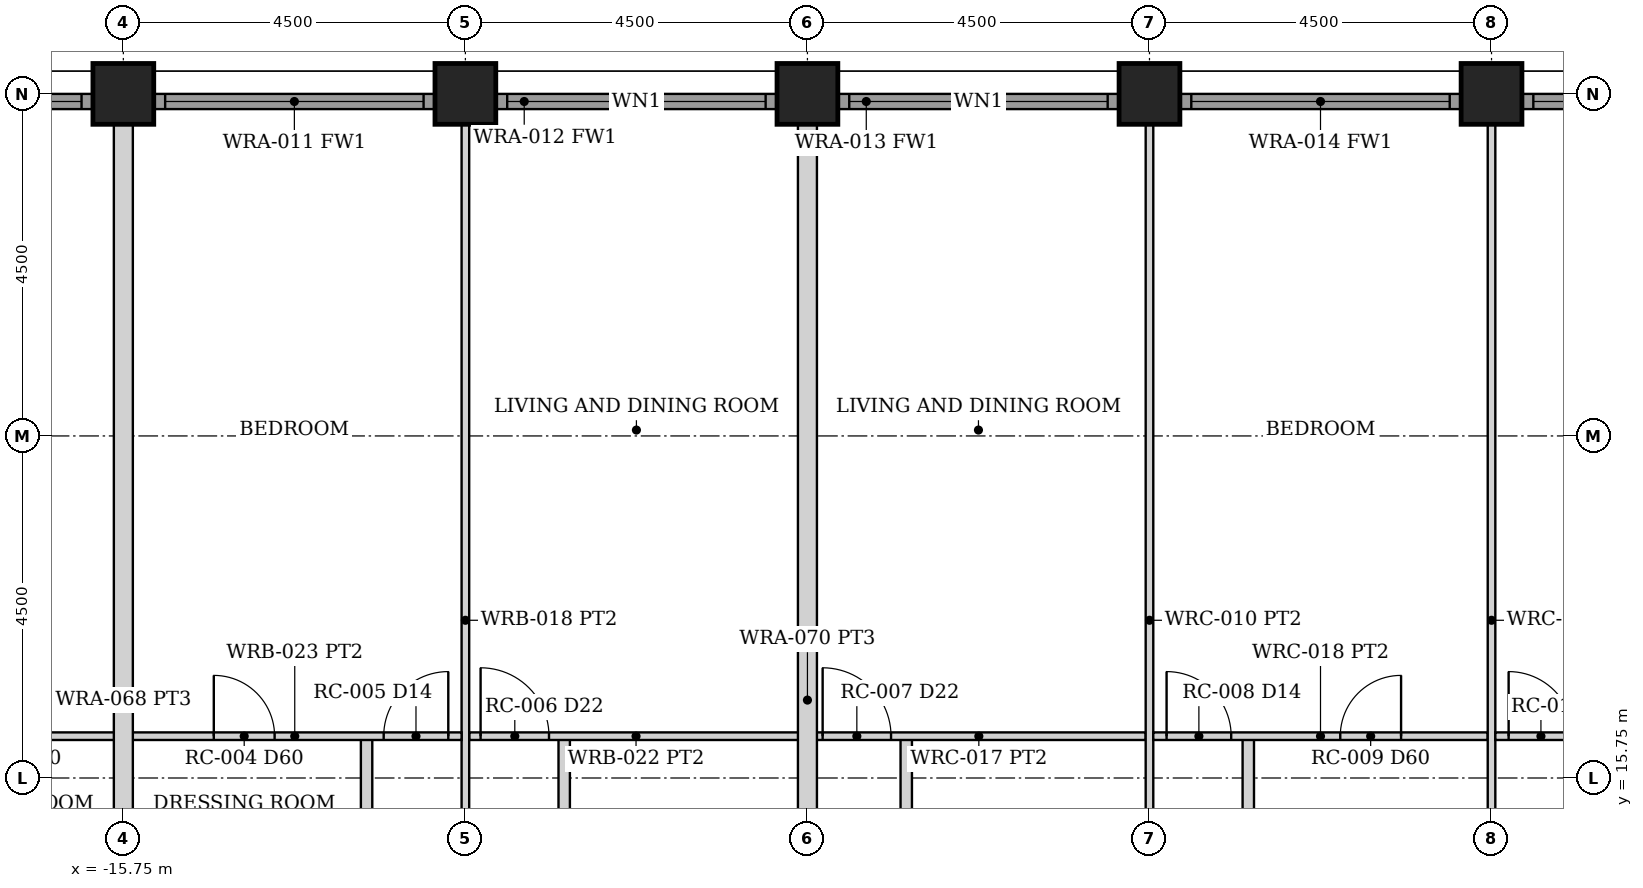
"""IFC4 building model, lengths in metres.
Left out: names, types, materials, properties, quantities, classifications, styles, units other than length and angle.
Written with IfcOpenShell. Run it as: python <this file> out.ifc"""

import sys

from ifc_helpers import new_model, si_unit, direction, frame, frame_2d, origin, origin_2d, place, context, subcontext, project, spatial, rectangle, hollow_rectangle, extrude, element, fill, save


model = new_model("IFC4")
c1 = context("Model", 3, precision=1e-05, world=origin(), true_north=direction((0.0, 1.0)))
c2 = subcontext(c1, "Body", "Model", "MODEL_VIEW")
j1 = project(units=[si_unit("LENGTHUNIT", "METRE"), si_unit("PLANEANGLEUNIT", "RADIAN")], contexts=[c1])
p1 = place(None, origin())
s1 = spatial("IfcSite", under=j1, at=p1, CompositionType="ELEMENT")
p2 = place(p1, origin())
s2 = spatial("IfcBuilding", under=s1, at=p2, CompositionType="ELEMENT")
p3 = place(p2, frame((0.0, 0.0, 47.5)))
s3 = spatial("IfcBuildingStorey", under=s2, at=p3, CompositionType="ELEMENT", Elevation=47.5)
for number, where, z_axis, x_axis in (
    (1, (-15.75, 24.75, 0.0), (0.0, 0.0, 1.0), (0.0, 1.0, 0.0)),
    (2, (-11.25, 24.75, 0.0), (0.0, 0.0, 1.0), (0.0, 1.0, 0.0)),
    (3, (-6.75, 24.75, 0.0), (0.0, 0.0, 1.0), (0.0, 1.0, 0.0)),
    (4, (-2.25, 24.75, 0.0), (0.0, 0.0, 1.0), (0.0, 1.0, 0.0)),
    (5, (2.25, 24.75, 0.0), (0.0, 0.0, 1.0), (0.0, 1.0, 0.0)),
):
    element("IfcColumn", number, at=place(p3, frame(where, z_axis=z_axis, x_axis=x_axis)), inside=s3, PredefinedType="COLUMN", context=c2, shape_type="SweptSolid", body=[
        extrude(hollow_rectangle(XDim=0.8, YDim=0.8, WallThickness=0.07, at=origin_2d()), origin(), (0.0, 0.0, 1.0), 3.5),
    ])
p4 = place(p3, frame((-19.845, 24.65, 0.0), z_axis=(0.0, 0.0, 1.0), x_axis=(1.0, 0.0, 0.0)))
e6 = element("IfcWall", 6, at=p4, inside=s3, PredefinedType="SOLIDWALL", context=c2, shape_type="SweptSolid", body=[
    extrude(rectangle(XDim=3.69, YDim=0.2, at=frame_2d((1.845, 0.0))), origin(), (0.0, 0.0, 1.0), 2.379),
])
p5 = place(p4, frame((0.145, 0.0, 0.3)))
e7 = element("IfcOpeningElement", 7, at=p5, cuts=e6, PredefinedType="OPENING", context=c2, shape_type="SweptSolid", body=[
    extrude(rectangle(XDim=3.4, YDim=1.929, at=frame_2d((1.7, 0.964))), frame((0.0, 0.11, 0.0), z_axis=(0.0, -1.0, 0.0), x_axis=(1.0, 0.0, 0.0)), (0.0, 0.0, 1.0), 0.22),
])
p6 = place(p3, frame((-15.345, 24.65, 0.0), z_axis=(0.0, 0.0, 1.0), x_axis=(1.0, 0.0, 0.0)))
e8 = element("IfcWall", 8, at=p6, inside=s3, PredefinedType="SOLIDWALL", context=c2, shape_type="SweptSolid", body=[
    extrude(rectangle(XDim=3.69, YDim=0.2, at=frame_2d((1.845, 0.0))), origin(), (0.0, 0.0, 1.0), 2.379),
])
p7 = place(p6, frame((0.145, 0.0, 0.3)))
e9 = element("IfcOpeningElement", 9, at=p7, cuts=e8, PredefinedType="OPENING", context=c2, shape_type="SweptSolid", body=[
    extrude(rectangle(XDim=3.4, YDim=1.929, at=frame_2d((1.7, 0.964))), frame((0.0, 0.11, 0.0), z_axis=(0.0, -1.0, 0.0), x_axis=(1.0, 0.0, 0.0)), (0.0, 0.0, 1.0), 0.22),
])
p8 = place(p3, frame((-10.845, 24.65, 0.0), z_axis=(0.0, 0.0, 1.0), x_axis=(1.0, 0.0, 0.0)))
e10 = element("IfcWall", 10, at=p8, inside=s3, PredefinedType="SOLIDWALL", context=c2, shape_type="SweptSolid", body=[
    extrude(rectangle(XDim=3.69, YDim=0.2, at=frame_2d((1.845, 0.0))), origin(), (0.0, 0.0, 1.0), 2.379),
])
p9 = place(p8, frame((0.145, 0.0, 0.3)))
e11 = element("IfcOpeningElement", 11, at=p9, cuts=e10, PredefinedType="OPENING", context=c2, shape_type="SweptSolid", body=[
    extrude(rectangle(XDim=3.4, YDim=1.929, at=frame_2d((1.7, 0.964))), frame((0.0, 0.11, 0.0), z_axis=(0.0, -1.0, 0.0), x_axis=(1.0, 0.0, 0.0)), (0.0, 0.0, 1.0), 0.22),
])
p10 = place(p3, frame((-6.345, 24.65, 0.0), z_axis=(0.0, 0.0, 1.0), x_axis=(1.0, 0.0, 0.0)))
e12 = element("IfcWall", 12, at=p10, inside=s3, PredefinedType="SOLIDWALL", context=c2, shape_type="SweptSolid", body=[
    extrude(rectangle(XDim=3.69, YDim=0.2, at=frame_2d((1.845, 0.0))), origin(), (0.0, 0.0, 1.0), 2.379),
])
p11 = place(p10, frame((0.145, 0.0, 0.3)))
e13 = element("IfcOpeningElement", 13, at=p11, cuts=e12, PredefinedType="OPENING", context=c2, shape_type="SweptSolid", body=[
    extrude(rectangle(XDim=3.4, YDim=1.929, at=frame_2d((1.7, 0.964))), frame((0.0, 0.11, 0.0), z_axis=(0.0, -1.0, 0.0), x_axis=(1.0, 0.0, 0.0)), (0.0, 0.0, 1.0), 0.22),
])
p12 = place(p3, frame((-1.845, 24.65, 0.0), z_axis=(0.0, 0.0, 1.0), x_axis=(1.0, 0.0, 0.0)))
e14 = element("IfcWall", 14, at=p12, inside=s3, PredefinedType="SOLIDWALL", context=c2, shape_type="SweptSolid", body=[
    extrude(rectangle(XDim=3.69, YDim=0.2, at=frame_2d((1.845, 0.0))), origin(), (0.0, 0.0, 1.0), 2.379),
])
p13 = place(p12, frame((0.145, 0.0, 0.3)))
e15 = element("IfcOpeningElement", 15, at=p13, cuts=e14, PredefinedType="OPENING", context=c2, shape_type="SweptSolid", body=[
    extrude(rectangle(XDim=3.4, YDim=1.929, at=frame_2d((1.7, 0.964))), frame((0.0, 0.11, 0.0), z_axis=(0.0, -1.0, 0.0), x_axis=(1.0, 0.0, 0.0)), (0.0, 0.0, 1.0), 0.22),
])
p14 = place(p3, frame((2.655, 24.65, 0.0), z_axis=(0.0, 0.0, 1.0), x_axis=(1.0, 0.0, 0.0)))
e16 = element("IfcWall", 16, at=p14, inside=s3, PredefinedType="SOLIDWALL", context=c2, shape_type="SweptSolid", body=[
    extrude(rectangle(XDim=3.69, YDim=0.2, at=frame_2d((1.845, 0.0))), origin(), (0.0, 0.0, 1.0), 2.379),
])
p15 = place(p14, frame((0.145, 0.0, 0.3)))
e17 = element("IfcOpeningElement", 17, at=p15, cuts=e16, PredefinedType="OPENING", context=c2, shape_type="SweptSolid", body=[
    extrude(rectangle(XDim=3.4, YDim=1.929, at=frame_2d((1.7, 0.964))), frame((0.0, 0.11, 0.0), z_axis=(0.0, -1.0, 0.0), x_axis=(1.0, 0.0, 0.0)), (0.0, 0.0, 1.0), 0.22),
])
p16 = place(p3, frame((-20.2, 16.3, 0.0), z_axis=(0.0, 0.0, 1.0), x_axis=(1.0, 0.0, 0.0)))
e18 = element("IfcWall", 18, at=p16, inside=s3, PredefinedType="PARTITIONING", context=c2, shape_type="SweptSolid", body=[
    extrude(rectangle(XDim=4.39, YDim=0.1, at=frame_2d((2.195, 0.0))), origin(), (0.0, 0.0, 1.0), 2.373),
])
p17 = place(p16, frame((0.175, 0.0, 0.0)))
e19 = element("IfcOpeningElement", 19, at=p17, cuts=e18, PredefinedType="OPENING", context=c2, shape_type="SweptSolid", body=[
    extrude(rectangle(XDim=0.85, YDim=2.1, at=frame_2d((0.425, 1.05))), frame((0.0, 0.06, 0.0), z_axis=(0.0, -1.0, 0.0), x_axis=(1.0, 0.0, 0.0)), (0.0, 0.0, 1.0), 0.12),
])
p18 = place(p16, frame((2.46, 0.0, 0.0)))
e20 = element("IfcOpeningElement", 20, at=p18, cuts=e18, PredefinedType="OPENING", context=c2, shape_type="SweptSolid", body=[
    extrude(rectangle(XDim=0.8, YDim=2.1, at=frame_2d((0.4, 1.05))), frame((0.0, 0.06, 0.0), z_axis=(0.0, -1.0, 0.0), x_axis=(1.0, 0.0, 0.0)), (0.0, 0.0, 1.0), 0.12),
])
p19 = place(p3, frame((-9.95, 11.3, 0.0), z_axis=(0.0, 0.0, 1.0), x_axis=(0.0, 1.0, 0.0)))
e21 = element("IfcWall", 21, at=p19, inside=s3, PredefinedType="PARTITIONING", context=c2, shape_type="SweptSolid", body=[
    extrude(rectangle(XDim=5.0, YDim=0.15, at=frame_2d((2.5, 0.0))), origin(), (0.0, 0.0, 1.0), 2.373),
])
p20 = place(p19, frame((2.05, 0.0, 0.0)))
e22 = element("IfcOpeningElement", 22, at=p20, cuts=e21, PredefinedType="OPENING", context=c2, shape_type="SweptSolid", body=[
    extrude(rectangle(XDim=0.9, YDim=2.1, at=frame_2d((0.45, 1.05))), frame((0.0, 0.085, 0.0), z_axis=(0.0, -1.0, 0.0), x_axis=(1.0, 0.0, 0.0)), (0.0, 0.0, 1.0), 0.17),
])
p21 = place(p3, frame((-11.2, 16.3, 0.0), z_axis=(0.0, 0.0, 1.0), x_axis=(1.0, 0.0, 0.0)))
e23 = element("IfcWall", 23, at=p21, inside=s3, PredefinedType="PARTITIONING", context=c2, shape_type="SweptSolid", body=[
    extrude(rectangle(XDim=4.39, YDim=0.1, at=frame_2d((2.195, 0.0))), origin(), (0.0, 0.0, 1.0), 2.373),
])
p22 = place(p21, frame((0.15, 0.0, 0.0)))
e24 = element("IfcOpeningElement", 24, at=p22, cuts=e23, PredefinedType="OPENING", context=c2, shape_type="SweptSolid", body=[
    extrude(rectangle(XDim=0.9, YDim=2.1, at=frame_2d((0.45, 1.05))), frame((0.0, 0.06, 0.0), z_axis=(0.0, -1.0, 0.0), x_axis=(1.0, 0.0, 0.0)), (0.0, 0.0, 1.0), 0.12),
])
p23 = place(p3, frame((-11.25, 11.3, 0.0), z_axis=(0.0, 0.0, 1.0), x_axis=(0.0, 1.0, 0.0)))
e25 = element("IfcWall", 25, at=p23, inside=s3, PredefinedType="PARTITIONING", context=c2, shape_type="SweptSolid", body=[
    extrude(rectangle(XDim=13.05, YDim=0.1, at=frame_2d((6.525, 0.0))), origin(), (0.0, 0.0, 1.0), 2.373),
])
p24 = place(p3, frame((-12.55, 11.3, 0.0), z_axis=(0.0, 0.0, 1.0), x_axis=(0.0, 1.0, 0.0)))
e26 = element("IfcWall", 26, at=p24, inside=s3, PredefinedType="PARTITIONING", context=c2, shape_type="SweptSolid", body=[
    extrude(rectangle(XDim=5.0, YDim=0.15, at=frame_2d((2.5, 0.0))), origin(), (0.0, 0.0, 1.0), 2.373),
])
p25 = place(p24, frame((0.85, 0.0, 0.0)))
e27 = element("IfcOpeningElement", 27, at=p25, cuts=e26, PredefinedType="OPENING", context=c2, shape_type="SweptSolid", body=[
    extrude(rectangle(XDim=0.9, YDim=2.1, at=frame_2d((0.45, 1.05))), frame((0.0, 0.085, 0.0), z_axis=(0.0, -1.0, 0.0), x_axis=(1.0, 0.0, 0.0)), (0.0, 0.0, 1.0), 0.17),
])
p26 = place(p3, frame((-15.69, 16.3, 0.0), z_axis=(0.0, 0.0, 1.0), x_axis=(1.0, 0.0, 0.0)))
e28 = element("IfcWall", 28, at=p26, inside=s3, PredefinedType="PARTITIONING", context=c2, shape_type="SweptSolid", body=[
    extrude(rectangle(XDim=4.39, YDim=0.1, at=frame_2d((2.195, 0.0))), origin(), (0.0, 0.0, 1.0), 2.373),
])
p27 = place(p26, frame((3.365, 0.0, 0.0)))
e29 = element("IfcOpeningElement", 29, at=p27, cuts=e28, PredefinedType="OPENING", context=c2, shape_type="SweptSolid", body=[
    extrude(rectangle(XDim=0.85, YDim=2.1, at=frame_2d((0.425, 1.05))), frame((0.0, 0.06, 0.0), z_axis=(0.0, -1.0, 0.0), x_axis=(1.0, 0.0, 0.0)), (0.0, 0.0, 1.0), 0.12),
])
p28 = place(p26, frame((1.13, 0.0, 0.0)))
e30 = element("IfcOpeningElement", 30, at=p28, cuts=e28, PredefinedType="OPENING", context=c2, shape_type="SweptSolid", body=[
    extrude(rectangle(XDim=0.8, YDim=2.1, at=frame_2d((0.4, 1.05))), frame((0.0, 0.06, 0.0), z_axis=(0.0, -1.0, 0.0), x_axis=(1.0, 0.0, 0.0)), (0.0, 0.0, 1.0), 0.12),
])
p29 = place(p3, frame((-5.45, 11.3, 0.0), z_axis=(0.0, 0.0, 1.0), x_axis=(0.0, 1.0, 0.0)))
e31 = element("IfcWall", 31, at=p29, inside=s3, PredefinedType="PARTITIONING", context=c2, shape_type="SweptSolid", body=[
    extrude(rectangle(XDim=5.0, YDim=0.15, at=frame_2d((2.5, 0.0))), origin(), (0.0, 0.0, 1.0), 2.373),
])
p30 = place(p29, frame((2.05, 0.0, 0.0)))
e32 = element("IfcOpeningElement", 32, at=p30, cuts=e31, PredefinedType="OPENING", context=c2, shape_type="SweptSolid", body=[
    extrude(rectangle(XDim=0.9, YDim=2.1, at=frame_2d((0.45, 1.05))), frame((0.0, 0.085, 0.0), z_axis=(0.0, -1.0, 0.0), x_axis=(1.0, 0.0, 0.0)), (0.0, 0.0, 1.0), 0.17),
])
p31 = place(p3, frame((-6.69, 16.3, 0.0), z_axis=(0.0, 0.0, 1.0), x_axis=(1.0, 0.0, 0.0)))
e33 = element("IfcWall", 33, at=p31, inside=s3, PredefinedType="PARTITIONING", context=c2, shape_type="SweptSolid", body=[
    extrude(rectangle(XDim=4.39, YDim=0.1, at=frame_2d((2.195, 0.0))), origin(), (0.0, 0.0, 1.0), 2.373),
])
p32 = place(p31, frame((0.14, 0.0, 0.0)))
e34 = element("IfcOpeningElement", 34, at=p32, cuts=e33, PredefinedType="OPENING", context=c2, shape_type="SweptSolid", body=[
    extrude(rectangle(XDim=0.9, YDim=2.1, at=frame_2d((0.45, 1.05))), frame((0.0, 0.06, 0.0), z_axis=(0.0, -1.0, 0.0), x_axis=(1.0, 0.0, 0.0)), (0.0, 0.0, 1.0), 0.12),
])
p33 = place(p3, frame((-2.25, 11.3, 0.0), z_axis=(0.0, 0.0, 1.0), x_axis=(0.0, 1.0, 0.0)))
e35 = element("IfcWall", 35, at=p33, inside=s3, PredefinedType="PARTITIONING", context=c2, shape_type="SweptSolid", body=[
    extrude(rectangle(XDim=13.05, YDim=0.1, at=frame_2d((6.525, 0.0))), origin(), (0.0, 0.0, 1.0), 2.373),
])
p34 = place(p3, frame((-0.95, 11.3, 0.0), z_axis=(0.0, 0.0, 1.0), x_axis=(0.0, 1.0, 0.0)))
e36 = element("IfcWall", 36, at=p34, inside=s3, PredefinedType="PARTITIONING", context=c2, shape_type="SweptSolid", body=[
    extrude(rectangle(XDim=5.0, YDim=0.15, at=frame_2d((2.5, 0.0))), origin(), (0.0, 0.0, 1.0), 2.373),
])
p35 = place(p34, frame((0.85, 0.0, 0.0)))
e37 = element("IfcOpeningElement", 37, at=p35, cuts=e36, PredefinedType="OPENING", context=c2, shape_type="SweptSolid", body=[
    extrude(rectangle(XDim=0.9, YDim=2.1, at=frame_2d((0.45, 1.05))), frame((0.0, 0.085, 0.0), z_axis=(0.0, -1.0, 0.0), x_axis=(1.0, 0.0, 0.0)), (0.0, 0.0, 1.0), 0.17),
])
p36 = place(p3, frame((-2.2, 16.3, 0.0), z_axis=(0.0, 0.0, 1.0), x_axis=(1.0, 0.0, 0.0)))
e38 = element("IfcWall", 38, at=p36, inside=s3, PredefinedType="PARTITIONING", context=c2, shape_type="SweptSolid", body=[
    extrude(rectangle(XDim=4.4, YDim=0.1, at=frame_2d((2.2, 0.0))), origin(), (0.0, 0.0, 1.0), 2.373),
])
p37 = place(p36, frame((0.175, 0.0, 0.0)))
e39 = element("IfcOpeningElement", 39, at=p37, cuts=e38, PredefinedType="OPENING", context=c2, shape_type="SweptSolid", body=[
    extrude(rectangle(XDim=0.85, YDim=2.1, at=frame_2d((0.425, 1.05))), frame((0.0, 0.06, 0.0), z_axis=(0.0, -1.0, 0.0), x_axis=(1.0, 0.0, 0.0)), (0.0, 0.0, 1.0), 0.12),
])
p38 = place(p36, frame((2.46, 0.0, 0.0)))
e40 = element("IfcOpeningElement", 40, at=p38, cuts=e38, PredefinedType="OPENING", context=c2, shape_type="SweptSolid", body=[
    extrude(rectangle(XDim=0.8, YDim=2.1, at=frame_2d((0.4, 1.05))), frame((0.0, 0.06, 0.0), z_axis=(0.0, -1.0, 0.0), x_axis=(1.0, 0.0, 0.0)), (0.0, 0.0, 1.0), 0.12),
])
p39 = place(p3, frame((2.25, 11.3, 0.0), z_axis=(0.0, 0.0, 1.0), x_axis=(0.0, 1.0, 0.0)))
e41 = element("IfcWall", 41, at=p39, inside=s3, PredefinedType="PARTITIONING", context=c2, shape_type="SweptSolid", body=[
    extrude(rectangle(XDim=13.05, YDim=0.1, at=frame_2d((6.525, 0.0))), origin(), (0.0, 0.0, 1.0), 2.373),
])
p40 = place(p3, frame((2.3, 16.3, 0.0), z_axis=(0.0, 0.0, 1.0), x_axis=(1.0, 0.0, 0.0)))
e42 = element("IfcWall", 42, at=p40, inside=s3, PredefinedType="PARTITIONING", context=c2, shape_type="SweptSolid", body=[
    extrude(rectangle(XDim=4.39, YDim=0.1, at=frame_2d((2.195, 0.0))), origin(), (0.0, 0.0, 1.0), 2.373),
])
p41 = place(p40, frame((0.175, 0.0, 0.0)))
e43 = element("IfcOpeningElement", 43, at=p41, cuts=e42, PredefinedType="OPENING", context=c2, shape_type="SweptSolid", body=[
    extrude(rectangle(XDim=0.85, YDim=2.1, at=frame_2d((0.425, 1.05))), frame((0.0, 0.06, 0.0), z_axis=(0.0, -1.0, 0.0), x_axis=(1.0, 0.0, 0.0)), (0.0, 0.0, 1.0), 0.12),
])
p42 = place(p40, frame((2.46, 0.0, 0.0)))
e44 = element("IfcOpeningElement", 44, at=p42, cuts=e42, PredefinedType="OPENING", context=c2, shape_type="SweptSolid", body=[
    extrude(rectangle(XDim=0.8, YDim=2.1, at=frame_2d((0.4, 1.05))), frame((0.0, 0.06, 0.0), z_axis=(0.0, -1.0, 0.0), x_axis=(1.0, 0.0, 0.0)), (0.0, 0.0, 1.0), 0.12),
])
for number, where, z_axis, x_axis in (
    (45, (-15.75, 9.2, 0.0), (0.0, 0.0, 1.0), (0.0, 1.0, 0.0)),
    (46, (-6.75, 9.2, 0.0), (0.0, 0.0, 1.0), (0.0, 1.0, 0.0)),
):
    element("IfcWall", number, at=place(p3, frame(where, z_axis=z_axis, x_axis=x_axis)), inside=s3, PredefinedType="PARTITIONING", context=c2, shape_type="SweptSolid", body=[
        extrude(rectangle(XDim=15.15, YDim=0.25, at=frame_2d((7.575, 0.0))), origin(), (0.0, 0.0, 1.0), 2.373),
    ])
p43 = place(p5, origin())
e47 = element("IfcWindow", 47, at=p43, inside=s3, PartitioningType="SINGLE_PANEL", PredefinedType="WINDOW", context=c2, shape_type="SweptSolid", body=[
    extrude(rectangle(XDim=3.4, YDim=1.929, at=frame_2d((1.7, 0.964))), frame((0.0, 0.03, 0.0), z_axis=(0.0, -1.0, 0.0), x_axis=(1.0, 0.0, 0.0)), (0.0, 0.0, 1.0), 0.06),
])
fill(e7, e47)
p44 = place(p7, origin())
e48 = element("IfcWindow", 48, at=p44, inside=s3, PartitioningType="SINGLE_PANEL", PredefinedType="WINDOW", context=c2, shape_type="SweptSolid", body=[
    extrude(rectangle(XDim=3.4, YDim=1.929, at=frame_2d((1.7, 0.964))), frame((0.0, 0.03, 0.0), z_axis=(0.0, -1.0, 0.0), x_axis=(1.0, 0.0, 0.0)), (0.0, 0.0, 1.0), 0.06),
])
fill(e9, e48)
p45 = place(p9, origin())
e49 = element("IfcWindow", 49, at=p45, inside=s3, PartitioningType="SINGLE_PANEL", PredefinedType="WINDOW", context=c2, shape_type="SweptSolid", body=[
    extrude(rectangle(XDim=3.4, YDim=1.929, at=frame_2d((1.7, 0.964))), frame((0.0, 0.03, 0.0), z_axis=(0.0, -1.0, 0.0), x_axis=(1.0, 0.0, 0.0)), (0.0, 0.0, 1.0), 0.06),
])
fill(e11, e49)
p46 = place(p11, origin())
e50 = element("IfcWindow", 50, at=p46, inside=s3, PartitioningType="SINGLE_PANEL", PredefinedType="WINDOW", context=c2, shape_type="SweptSolid", body=[
    extrude(rectangle(XDim=3.4, YDim=1.929, at=frame_2d((1.7, 0.964))), frame((0.0, 0.03, 0.0), z_axis=(0.0, -1.0, 0.0), x_axis=(1.0, 0.0, 0.0)), (0.0, 0.0, 1.0), 0.06),
])
fill(e13, e50)
p47 = place(p13, origin())
e51 = element("IfcWindow", 51, at=p47, inside=s3, PartitioningType="SINGLE_PANEL", PredefinedType="WINDOW", context=c2, shape_type="SweptSolid", body=[
    extrude(rectangle(XDim=3.4, YDim=1.929, at=frame_2d((1.7, 0.964))), frame((0.0, 0.03, 0.0), z_axis=(0.0, -1.0, 0.0), x_axis=(1.0, 0.0, 0.0)), (0.0, 0.0, 1.0), 0.06),
])
fill(e15, e51)
p48 = place(p15, origin())
e52 = element("IfcWindow", 52, at=p48, inside=s3, PartitioningType="SINGLE_PANEL", PredefinedType="WINDOW", context=c2, shape_type="SweptSolid", body=[
    extrude(rectangle(XDim=3.4, YDim=1.929, at=frame_2d((1.7, 0.964))), frame((0.0, 0.03, 0.0), z_axis=(0.0, -1.0, 0.0), x_axis=(1.0, 0.0, 0.0)), (0.0, 0.0, 1.0), 0.06),
])
fill(e17, e52)
p49 = place(p22, origin())
e53 = element("IfcDoor", 53, at=p49, inside=s3, OperationType="SINGLE_SWING_LEFT", PredefinedType="DOOR", context=c2, shape_type="SweptSolid", body=[
    extrude(rectangle(XDim=0.9, YDim=2.1, at=frame_2d((0.45, 1.05))), frame((0.0, 0.025, 0.0), z_axis=(0.0, -1.0, 0.0), x_axis=(1.0, 0.0, 0.0)), (0.0, 0.0, 1.0), 0.05),
])
fill(e24, e53)
p50 = place(p27, origin())
e54 = element("IfcDoor", 54, at=p50, inside=s3, OperationType="SINGLE_SWING_RIGHT", PredefinedType="DOOR", context=c2, shape_type="SweptSolid", body=[
    extrude(rectangle(XDim=0.85, YDim=2.1, at=frame_2d((0.425, 1.05))), frame((0.0, 0.025, 0.0), z_axis=(0.0, -1.0, 0.0), x_axis=(1.0, 0.0, 0.0)), (0.0, 0.0, 1.0), 0.05),
])
fill(e29, e54)
p51 = place(p28, origin())
e55 = element("IfcDoor", 55, at=p51, inside=s3, OperationType="SINGLE_SWING_LEFT", PredefinedType="DOOR", context=c2, shape_type="SweptSolid", body=[
    extrude(rectangle(XDim=0.8, YDim=2.1, at=frame_2d((0.4, 1.05))), frame((0.0, 0.025, 0.0), z_axis=(0.0, -1.0, 0.0), x_axis=(1.0, 0.0, 0.0)), (0.0, 0.0, 1.0), 0.05),
])
fill(e30, e55)
p52 = place(p32, origin())
e56 = element("IfcDoor", 56, at=p52, inside=s3, OperationType="SINGLE_SWING_LEFT", PredefinedType="DOOR", context=c2, shape_type="SweptSolid", body=[
    extrude(rectangle(XDim=0.9, YDim=2.1, at=frame_2d((0.45, 1.05))), frame((0.0, 0.025, 0.0), z_axis=(0.0, -1.0, 0.0), x_axis=(1.0, 0.0, 0.0)), (0.0, 0.0, 1.0), 0.05),
])
fill(e34, e56)
p53 = place(p37, origin())
e57 = element("IfcDoor", 57, at=p53, inside=s3, OperationType="SINGLE_SWING_LEFT", PredefinedType="DOOR", context=c2, shape_type="SweptSolid", body=[
    extrude(rectangle(XDim=0.85, YDim=2.1, at=frame_2d((0.425, 1.05))), frame((0.0, 0.025, 0.0), z_axis=(0.0, -1.0, 0.0), x_axis=(1.0, 0.0, 0.0)), (0.0, 0.0, 1.0), 0.05),
])
fill(e39, e57)
p54 = place(p38, origin())
e58 = element("IfcDoor", 58, at=p54, inside=s3, OperationType="SINGLE_SWING_RIGHT", PredefinedType="DOOR", context=c2, shape_type="SweptSolid", body=[
    extrude(rectangle(XDim=0.8, YDim=2.1, at=frame_2d((0.4, 1.05))), frame((0.0, 0.025, 0.0), z_axis=(0.0, -1.0, 0.0), x_axis=(1.0, 0.0, 0.0)), (0.0, 0.0, 1.0), 0.05),
])
fill(e40, e58)
p55 = place(p41, origin())
e59 = element("IfcDoor", 59, at=p55, inside=s3, OperationType="SINGLE_SWING_LEFT", PredefinedType="DOOR", context=c2, shape_type="SweptSolid", body=[
    extrude(rectangle(XDim=0.85, YDim=2.1, at=frame_2d((0.425, 1.05))), frame((0.0, 0.025, 0.0), z_axis=(0.0, -1.0, 0.0), x_axis=(1.0, 0.0, 0.0)), (0.0, 0.0, 1.0), 0.05),
])
fill(e43, e59)
save(model, sys.argv[1])
